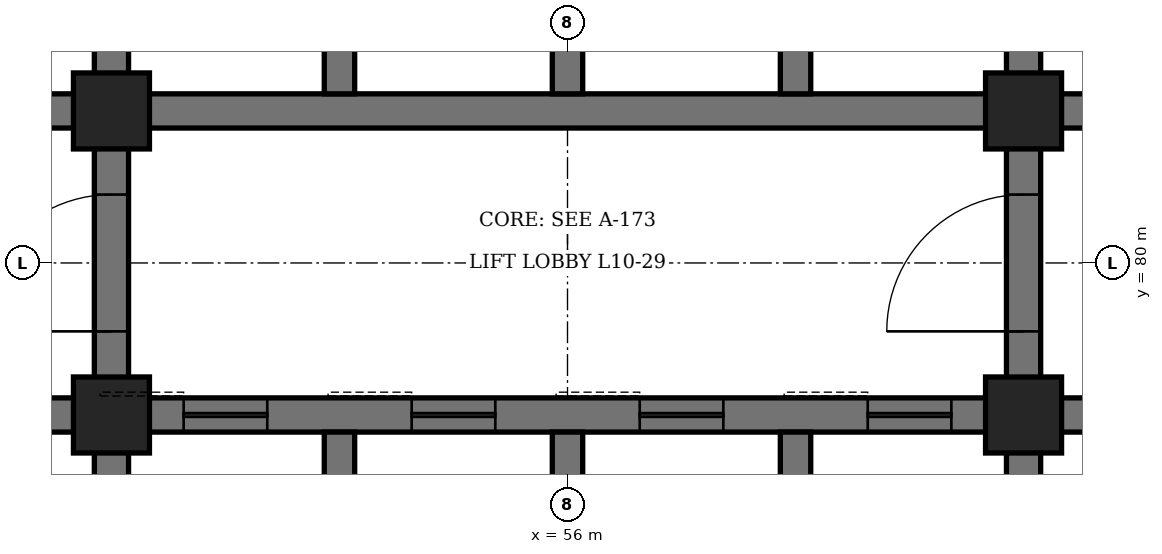
"""IFC4 building model, lengths in metres.
Left out: names, types, materials, properties, quantities, classifications, styles, units other than length and angle.
Written with IfcOpenShell. Run it as: python <this file> out.ifc"""

import sys

from ifc_helpers import new_model, si_unit, direction, frame, frame_2d, origin, origin_2d, place, context, subcontext, project, spatial, rectangle, hollow_rectangle, extrude, element, fill, save


model = new_model("IFC4")
c1 = context("Model", 3, precision=1e-05, world=origin(), true_north=direction((0.0, 1.0)))
c2 = subcontext(c1, "Body", "Model", "MODEL_VIEW")
j1 = project(units=[si_unit("LENGTHUNIT", "METRE"), si_unit("PLANEANGLEUNIT", "RADIAN")], contexts=[c1])
p1 = place(None, origin())
s1 = spatial("IfcSite", under=j1, at=p1, CompositionType="ELEMENT")
p2 = place(p1, origin())
s2 = spatial("IfcBuilding", under=s1, at=p2, CompositionType="ELEMENT")
p3 = place(p2, frame((0.0, 0.0, 51.7)))
s3 = spatial("IfcBuildingStorey", under=s2, at=p3, CompositionType="ELEMENT", Elevation=51.7)
p4 = place(p3, frame((50.0, 71.6, 0.0), z_axis=(0.0, 0.0, 1.0), x_axis=(0.0, 1.0, 0.0)))
e1 = element("IfcWall", 1, at=p4, inside=s3, PredefinedType="SHEAR", context=c2, shape_type="SweptSolid", body=[
    extrude(rectangle(XDim=16.8, YDim=0.45, at=frame_2d((8.4, 0.0))), origin(), (0.0, 0.0, 1.0), 4.2),
])
p5 = place(p4, frame((7.5, 0.0, 0.0)))
e2 = element("IfcOpeningElement", 2, at=p5, cuts=e1, PredefinedType="OPENING", context=c2, shape_type="SweptSolid", body=[
    extrude(rectangle(XDim=1.8, YDim=2.4, at=frame_2d((0.9, 1.2))), frame((0.0, 0.235, 0.0), z_axis=(0.0, -1.0, 0.0), x_axis=(1.0, 0.0, 0.0)), (0.0, 0.0, 1.0), 0.47),
])
p6 = place(p3, frame((62.0, 71.6, 0.0), z_axis=(0.0, 0.0, 1.0), x_axis=(0.0, 1.0, 0.0)))
e3 = element("IfcWall", 3, at=p6, inside=s3, PredefinedType="SHEAR", context=c2, shape_type="SweptSolid", body=[
    extrude(rectangle(XDim=16.8, YDim=0.45, at=frame_2d((8.4, 0.0))), origin(), (0.0, 0.0, 1.0), 4.2),
])
p7 = place(p6, frame((7.5, 0.0, 0.0)))
e4 = element("IfcOpeningElement", 4, at=p7, cuts=e3, PredefinedType="OPENING", context=c2, shape_type="SweptSolid", body=[
    extrude(rectangle(XDim=1.8, YDim=2.4, at=frame_2d((0.9, 1.2))), frame((0.0, 0.235, 0.0), z_axis=(0.0, -1.0, 0.0), x_axis=(1.0, 0.0, 0.0)), (0.0, 0.0, 1.0), 0.47),
])
p8 = place(p3, frame((44.6, 78.0, 0.0), z_axis=(0.0, 0.0, 1.0), x_axis=(1.0, 0.0, 0.0)))
e5 = element("IfcWall", 5, at=p8, inside=s3, PredefinedType="SHEAR", context=c2, shape_type="SweptSolid", body=[
    extrude(rectangle(XDim=5.175, YDim=0.45, at=frame_2d((2.587, 0.0))), origin(), (0.0, 0.0, 1.0), 4.2),
])
p9 = place(p8, frame((1.8, 0.0, 0.0)))
e6 = element("IfcOpeningElement", 6, at=p9, cuts=e5, PredefinedType="OPENING", context=c2, shape_type="SweptSolid", body=[
    extrude(rectangle(XDim=1.2, YDim=2.1, at=frame_2d((0.6, 1.05))), frame((0.0, 0.235, 0.0), z_axis=(0.0, -1.0, 0.0), x_axis=(1.0, 0.0, 0.0)), (0.0, 0.0, 1.0), 0.47),
])
p10 = place(p3, frame((44.6, 82.0, 0.0), z_axis=(0.0, 0.0, 1.0), x_axis=(1.0, 0.0, 0.0)))
e7 = element("IfcWall", 7, at=p10, inside=s3, PredefinedType="SHEAR", context=c2, shape_type="SweptSolid", body=[
    extrude(rectangle(XDim=5.175, YDim=0.45, at=frame_2d((2.587, 0.0))), origin(), (0.0, 0.0, 1.0), 4.2),
])
p11 = place(p10, frame((0.7, 0.0, 0.0)))
e8 = element("IfcOpeningElement", 8, at=p11, cuts=e7, PredefinedType="OPENING", context=c2, shape_type="SweptSolid", body=[
    extrude(rectangle(XDim=0.9, YDim=2.1, at=frame_2d((0.45, 1.05))), frame((0.0, 0.235, 0.0), z_axis=(0.0, -1.0, 0.0), x_axis=(1.0, 0.0, 0.0)), (0.0, 0.0, 1.0), 0.47),
])
p12 = place(p3, frame((62.225, 78.0, 0.0), z_axis=(0.0, 0.0, 1.0), x_axis=(1.0, 0.0, 0.0)))
e9 = element("IfcWall", 9, at=p12, inside=s3, PredefinedType="SHEAR", context=c2, shape_type="SweptSolid", body=[
    extrude(rectangle(XDim=5.175, YDim=0.45, at=frame_2d((2.587, 0.0))), origin(), (0.0, 0.0, 1.0), 4.2),
])
p13 = place(p12, frame((2.175, 0.0, 0.0)))
e10 = element("IfcOpeningElement", 10, at=p13, cuts=e9, PredefinedType="OPENING", context=c2, shape_type="SweptSolid", body=[
    extrude(rectangle(XDim=1.2, YDim=2.1, at=frame_2d((0.6, 1.05))), frame((0.0, 0.235, 0.0), z_axis=(0.0, -1.0, 0.0), x_axis=(1.0, 0.0, 0.0)), (0.0, 0.0, 1.0), 0.47),
])
p14 = place(p3, frame((62.225, 82.0, 0.0), z_axis=(0.0, 0.0, 1.0), x_axis=(1.0, 0.0, 0.0)))
e11 = element("IfcWall", 11, at=p14, inside=s3, PredefinedType="SHEAR", context=c2, shape_type="SweptSolid", body=[
    extrude(rectangle(XDim=5.175, YDim=0.45, at=frame_2d((2.587, 0.0))), origin(), (0.0, 0.0, 1.0), 4.2),
])
p15 = place(p14, frame((2.175, 0.0, 0.0)))
e12 = element("IfcOpeningElement", 12, at=p15, cuts=e11, PredefinedType="OPENING", context=c2, shape_type="SweptSolid", body=[
    extrude(rectangle(XDim=1.2, YDim=2.1, at=frame_2d((0.6, 1.05))), frame((0.0, 0.235, 0.0), z_axis=(0.0, -1.0, 0.0), x_axis=(1.0, 0.0, 0.0)), (0.0, 0.0, 1.0), 0.47),
])
p16 = place(p3, frame((50.225, 78.0, 0.0), z_axis=(0.0, 0.0, 1.0), x_axis=(1.0, 0.0, 0.0)))
e13 = element("IfcWall", 13, at=p16, inside=s3, PredefinedType="SHEAR", context=c2, shape_type="SweptSolid", body=[
    extrude(rectangle(XDim=11.55, YDim=0.45, at=frame_2d((5.775, 0.0))), origin(), (0.0, 0.0, 1.0), 4.2),
])
p17 = place(p16, frame((0.725, 0.0, 0.0)))
e14 = element("IfcOpeningElement", 14, at=p17, cuts=e13, PredefinedType="OPENING", context=c2, shape_type="SweptSolid", body=[
    extrude(rectangle(XDim=1.1, YDim=2.2, at=frame_2d((0.55, 1.1))), frame((0.0, 0.235, 0.0), z_axis=(0.0, -1.0, 0.0), x_axis=(1.0, 0.0, 0.0)), (0.0, 0.0, 1.0), 0.47),
])
p18 = place(p16, frame((3.725, 0.0, 0.0)))
e15 = element("IfcOpeningElement", 15, at=p18, cuts=e13, PredefinedType="OPENING", context=c2, shape_type="SweptSolid", body=[
    extrude(rectangle(XDim=1.1, YDim=2.2, at=frame_2d((0.55, 1.1))), frame((0.0, 0.235, 0.0), z_axis=(0.0, -1.0, 0.0), x_axis=(1.0, 0.0, 0.0)), (0.0, 0.0, 1.0), 0.47),
])
p19 = place(p16, frame((6.725, 0.0, 0.0)))
e16 = element("IfcOpeningElement", 16, at=p19, cuts=e13, PredefinedType="OPENING", context=c2, shape_type="SweptSolid", body=[
    extrude(rectangle(XDim=1.1, YDim=2.2, at=frame_2d((0.55, 1.1))), frame((0.0, 0.235, 0.0), z_axis=(0.0, -1.0, 0.0), x_axis=(1.0, 0.0, 0.0)), (0.0, 0.0, 1.0), 0.47),
])
p20 = place(p16, frame((9.725, 0.0, 0.0)))
e17 = element("IfcOpeningElement", 17, at=p20, cuts=e13, PredefinedType="OPENING", context=c2, shape_type="SweptSolid", body=[
    extrude(rectangle(XDim=1.1, YDim=2.2, at=frame_2d((0.55, 1.1))), frame((0.0, 0.235, 0.0), z_axis=(0.0, -1.0, 0.0), x_axis=(1.0, 0.0, 0.0)), (0.0, 0.0, 1.0), 0.47),
])
p21 = place(p3, frame((50.225, 82.0, 0.0), z_axis=(0.0, 0.0, 1.0), x_axis=(1.0, 0.0, 0.0)))
e18 = element("IfcWall", 18, at=p21, inside=s3, PredefinedType="SHEAR", context=c2, shape_type="SweptSolid", body=[
    extrude(rectangle(XDim=11.55, YDim=0.45, at=frame_2d((5.775, 0.0))), origin(), (0.0, 0.0, 1.0), 4.2),
])
p22 = place(p3, frame((53.0, 74.2, 0.0), z_axis=(0.0, 0.0, 1.0), x_axis=(0.0, 1.0, 0.0)))
e19 = element("IfcWall", 19, at=p22, inside=s3, PredefinedType="SHEAR", context=c2, shape_type="SweptSolid", body=[
    extrude(rectangle(XDim=3.575, YDim=0.4, at=frame_2d((1.788, 0.0))), origin(), (0.0, 0.0, 1.0), 4.2),
])
p23 = place(p3, frame((53.0, 82.225, 0.0), z_axis=(0.0, 0.0, 1.0), x_axis=(0.0, 1.0, 0.0)))
e20 = element("IfcWall", 20, at=p23, inside=s3, PredefinedType="SHEAR", context=c2, shape_type="SweptSolid", body=[
    extrude(rectangle(XDim=3.55, YDim=0.4, at=frame_2d((1.775, 0.0))), origin(), (0.0, 0.0, 1.0), 4.2),
])
p24 = place(p3, frame((56.0, 74.2, 0.0), z_axis=(0.0, 0.0, 1.0), x_axis=(0.0, 1.0, 0.0)))
e21 = element("IfcWall", 21, at=p24, inside=s3, PredefinedType="SHEAR", context=c2, shape_type="SweptSolid", body=[
    extrude(rectangle(XDim=3.575, YDim=0.4, at=frame_2d((1.788, 0.0))), origin(), (0.0, 0.0, 1.0), 4.2),
])
p25 = place(p3, frame((56.0, 82.225, 0.0), z_axis=(0.0, 0.0, 1.0), x_axis=(0.0, 1.0, 0.0)))
e22 = element("IfcWall", 22, at=p25, inside=s3, PredefinedType="SHEAR", context=c2, shape_type="SweptSolid", body=[
    extrude(rectangle(XDim=3.55, YDim=0.4, at=frame_2d((1.775, 0.0))), origin(), (0.0, 0.0, 1.0), 4.2),
])
p26 = place(p3, frame((59.0, 74.2, 0.0), z_axis=(0.0, 0.0, 1.0), x_axis=(0.0, 1.0, 0.0)))
e23 = element("IfcWall", 23, at=p26, inside=s3, PredefinedType="SHEAR", context=c2, shape_type="SweptSolid", body=[
    extrude(rectangle(XDim=3.575, YDim=0.4, at=frame_2d((1.788, 0.0))), origin(), (0.0, 0.0, 1.0), 4.2),
])
p27 = place(p3, frame((59.0, 82.225, 0.0), z_axis=(0.0, 0.0, 1.0), x_axis=(0.0, 1.0, 0.0)))
e24 = element("IfcWall", 24, at=p27, inside=s3, PredefinedType="SHEAR", context=c2, shape_type="SweptSolid", body=[
    extrude(rectangle(XDim=3.55, YDim=0.4, at=frame_2d((1.775, 0.0))), origin(), (0.0, 0.0, 1.0), 4.2),
])
for number, where, z_axis, x_axis in (
    (25, (50.0, 78.0, 0.0), (0.0, 0.0, 1.0), (1.0, 0.0, 0.0)),
    (26, (50.0, 82.0, 0.0), (0.0, 0.0, 1.0), (1.0, 0.0, 0.0)),
    (27, (62.0, 78.0, 0.0), (0.0, 0.0, 1.0), (1.0, 0.0, 0.0)),
    (28, (62.0, 82.0, 0.0), (0.0, 0.0, 1.0), (1.0, 0.0, 0.0)),
):
    element("IfcColumn", number, at=place(p3, frame(where, z_axis=z_axis, x_axis=x_axis)), inside=s3, PredefinedType="COLUMN", context=c2, shape_type="SweptSolid", body=[
        extrude(hollow_rectangle(XDim=1.0, YDim=1.0, WallThickness=0.15, at=origin_2d()), origin(), (0.0, 0.0, 1.0), 4.2),
    ])
p28 = place(p5, origin())
e29 = element("IfcDoor", 29, at=p28, inside=s3, OperationType="DOUBLE_DOOR_SINGLE_SWING", PredefinedType="DOOR", context=c2, shape_type="SweptSolid", body=[
    extrude(rectangle(XDim=1.8, YDim=2.4, at=frame_2d((0.9, 1.2))), frame((0.0, 0.225, 0.0), z_axis=(0.0, -1.0, 0.0), x_axis=(1.0, 0.0, 0.0)), (0.0, 0.0, 1.0), 0.449),
])
fill(e2, e29)
p29 = place(p7, origin())
e30 = element("IfcDoor", 30, at=p29, inside=s3, OperationType="DOUBLE_DOOR_SINGLE_SWING", PredefinedType="DOOR", context=c2, shape_type="SweptSolid", body=[
    extrude(rectangle(XDim=1.8, YDim=2.4, at=frame_2d((0.9, 1.2))), frame((0.0, 0.225, 0.0), z_axis=(0.0, -1.0, 0.0), x_axis=(1.0, 0.0, 0.0)), (0.0, 0.0, 1.0), 0.449),
])
fill(e4, e30)
p30 = place(p17, origin())
e31 = element("IfcDoor", 31, at=p30, inside=s3, OperationType="SLIDING_TO_LEFT", PredefinedType="DOOR", context=c2, shape_type="SweptSolid", body=[
    extrude(rectangle(XDim=1.1, YDim=2.2, at=frame_2d((0.55, 1.1))), frame((0.0, 0.225, 0.0), z_axis=(0.0, -1.0, 0.0), x_axis=(1.0, 0.0, 0.0)), (0.0, 0.0, 1.0), 0.449),
])
fill(e14, e31)
p31 = place(p18, origin())
e32 = element("IfcDoor", 32, at=p31, inside=s3, OperationType="SLIDING_TO_LEFT", PredefinedType="DOOR", context=c2, shape_type="SweptSolid", body=[
    extrude(rectangle(XDim=1.1, YDim=2.2, at=frame_2d((0.55, 1.1))), frame((0.0, 0.225, 0.0), z_axis=(0.0, -1.0, 0.0), x_axis=(1.0, 0.0, 0.0)), (0.0, 0.0, 1.0), 0.449),
])
fill(e15, e32)
p32 = place(p19, origin())
e33 = element("IfcDoor", 33, at=p32, inside=s3, OperationType="SLIDING_TO_LEFT", PredefinedType="DOOR", context=c2, shape_type="SweptSolid", body=[
    extrude(rectangle(XDim=1.1, YDim=2.2, at=frame_2d((0.55, 1.1))), frame((0.0, 0.225, 0.0), z_axis=(0.0, -1.0, 0.0), x_axis=(1.0, 0.0, 0.0)), (0.0, 0.0, 1.0), 0.449),
])
fill(e16, e33)
p33 = place(p20, origin())
e34 = element("IfcDoor", 34, at=p33, inside=s3, OperationType="SLIDING_TO_LEFT", PredefinedType="DOOR", context=c2, shape_type="SweptSolid", body=[
    extrude(rectangle(XDim=1.1, YDim=2.2, at=frame_2d((0.55, 1.1))), frame((0.0, 0.225, 0.0), z_axis=(0.0, -1.0, 0.0), x_axis=(1.0, 0.0, 0.0)), (0.0, 0.0, 1.0), 0.449),
])
fill(e17, e34)
save(model, sys.argv[1])
